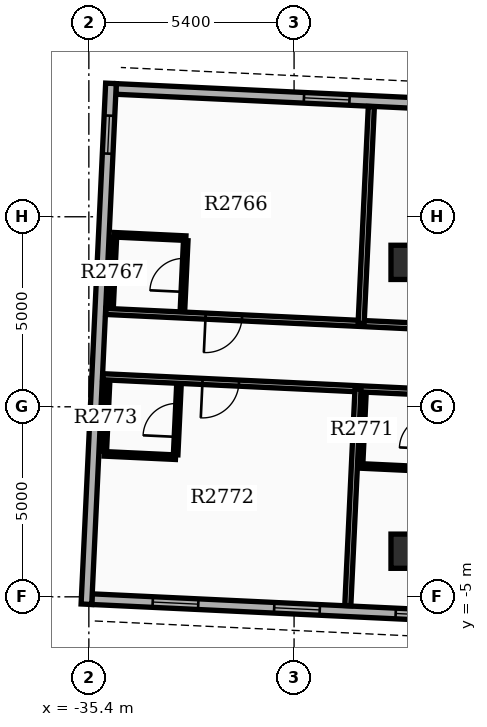
"""IFC4 building model, lengths in metres.
Left out: names, types, materials, properties, quantities, classifications, styles, units other than length and angle.
Written with IfcOpenShell. Run it as: python <this file> out.ifc"""

import sys

from ifc_helpers import new_model, si_unit, direction, frame, frame_2d, origin, origin_2d, place, context, subcontext, project, spatial, rectangle, extrude, element, fill, save


model = new_model("IFC4")
c1 = context("Model", 3, precision=1e-05, world=origin(), true_north=direction((0.0, 1.0)))
c2 = subcontext(c1, "Body", "Model", "MODEL_VIEW")
j1 = project(units=[si_unit("LENGTHUNIT", "METRE"), si_unit("PLANEANGLEUNIT", "RADIAN")], contexts=[c1])
p1 = place(None, origin())
s1 = spatial("IfcSite", under=j1, at=p1, CompositionType="ELEMENT")
p2 = place(p1, origin())
s2 = spatial("IfcBuilding", under=s1, at=p2, CompositionType="ELEMENT")
p3 = place(p2, frame((0.0, 0.0, 172.2)))
s3 = spatial("IfcBuildingStorey", under=s2, at=p3, CompositionType="ELEMENT", Elevation=172.2)
for number, where, z_axis, x_axis in (
    (1, (-27.0, -3.8, 0.0), (0.0, 0.0, 1.0), (1.0, 0.0, 0.0)),
    (2, (-27.0, 3.8, 0.0), (0.0, 0.0, 1.0), (1.0, 0.0, 0.0)),
):
    element("IfcColumn", number, at=place(p3, frame(where, z_axis=z_axis, x_axis=x_axis)), inside=s3, PredefinedType="COLUMN", context=c2, shape_type="SweptSolid", body=[
        extrude(rectangle(XDim=0.9, YDim=0.9, at=origin_2d()), origin(), (0.0, 0.0, 1.0), 3.9),
    ])
p4 = place(p3, frame((-14.607, 7.416, 0.0), z_axis=(0.0, 0.0, 1.0), x_axis=(-0.998890015344, 0.047103473814, 0.0)))
e3 = element("IfcWall", 3, at=p4, inside=s3, PredefinedType="STANDARD", context=c2, shape_type="SweptSolid", body=[
    extrude(rectangle(XDim=20.1, YDim=0.28, at=frame_2d((10.05, 0.0))), origin(), (0.0, 0.0, 1.0), 2.97),
])
p5 = place(p4, frame((1.6, 0.0, 0.8)))
e4 = element("IfcOpeningElement", 4, at=p5, cuts=e3, PredefinedType="OPENING", context=c2, shape_type="SweptSolid", body=[
    extrude(rectangle(XDim=1.2, YDim=1.6, at=frame_2d((0.6, 0.8))), frame((0.0, 0.15, 0.0), z_axis=(0.0, -1.0, 0.0), x_axis=(1.0, 0.0, 0.0)), (0.0, 0.0, 1.0), 0.3),
])
p6 = place(p4, frame((6.8, 0.0, 0.8)))
e5 = element("IfcOpeningElement", 5, at=p6, cuts=e3, PredefinedType="OPENING", context=c2, shape_type="SweptSolid", body=[
    extrude(rectangle(XDim=1.2, YDim=1.6, at=frame_2d((0.6, 0.8))), frame((0.0, 0.15, 0.0), z_axis=(0.0, -1.0, 0.0), x_axis=(1.0, 0.0, 0.0)), (0.0, 0.0, 1.0), 0.3),
])
p7 = place(p4, frame((10.0, 0.0, 0.8)))
e6 = element("IfcOpeningElement", 6, at=p7, cuts=e3, PredefinedType="OPENING", context=c2, shape_type="SweptSolid", body=[
    extrude(rectangle(XDim=1.2, YDim=1.6, at=frame_2d((0.6, 0.8))), frame((0.0, 0.15, 0.0), z_axis=(0.0, -1.0, 0.0), x_axis=(1.0, 0.0, 0.0)), (0.0, 0.0, 1.0), 0.3),
])
p8 = place(p4, frame((13.95, 0.0, 0.8)))
e7 = element("IfcOpeningElement", 7, at=p8, cuts=e3, PredefinedType="OPENING", context=c2, shape_type="SweptSolid", body=[
    extrude(rectangle(XDim=1.2, YDim=1.6, at=frame_2d((0.6, 0.8))), frame((0.0, 0.15, 0.0), z_axis=(0.0, -1.0, 0.0), x_axis=(1.0, 0.0, 0.0)), (0.0, 0.0, 1.0), 0.3),
])
p9 = place(p3, frame((-35.318, -5.062, 0.0), z_axis=(0.0, 0.0, 1.0), x_axis=(0.998890015344, -0.047103473814, 0.0)))
e8 = element("IfcWall", 8, at=p9, inside=s3, PredefinedType="STANDARD", context=c2, shape_type="SweptSolid", body=[
    extrude(rectangle(XDim=20.1, YDim=0.28, at=frame_2d((10.05, 0.0))), origin(), (0.0, 0.0, 1.0), 2.97),
])
p10 = place(p9, frame((1.6, 0.0, 0.8)))
e9 = element("IfcOpeningElement", 9, at=p10, cuts=e8, PredefinedType="OPENING", context=c2, shape_type="SweptSolid", body=[
    extrude(rectangle(XDim=1.2, YDim=1.6, at=frame_2d((0.6, 0.8))), frame((0.0, 0.15, 0.0), z_axis=(0.0, -1.0, 0.0), x_axis=(1.0, 0.0, 0.0)), (0.0, 0.0, 1.0), 0.3),
])
p11 = place(p9, frame((4.8, 0.0, 0.8)))
e10 = element("IfcOpeningElement", 10, at=p11, cuts=e8, PredefinedType="OPENING", context=c2, shape_type="SweptSolid", body=[
    extrude(rectangle(XDim=1.2, YDim=1.6, at=frame_2d((0.6, 0.8))), frame((0.0, 0.15, 0.0), z_axis=(0.0, -1.0, 0.0), x_axis=(1.0, 0.0, 0.0)), (0.0, 0.0, 1.0), 0.3),
])
p12 = place(p9, frame((8.0, 0.0, 0.8)))
e11 = element("IfcOpeningElement", 11, at=p12, cuts=e8, PredefinedType="OPENING", context=c2, shape_type="SweptSolid", body=[
    extrude(rectangle(XDim=1.2, YDim=1.6, at=frame_2d((0.6, 0.8))), frame((0.0, 0.15, 0.0), z_axis=(0.0, -1.0, 0.0), x_axis=(1.0, 0.0, 0.0)), (0.0, 0.0, 1.0), 0.3),
])
p13 = place(p9, frame((11.2, 0.0, 0.8)))
e12 = element("IfcOpeningElement", 12, at=p13, cuts=e8, PredefinedType="OPENING", context=c2, shape_type="SweptSolid", body=[
    extrude(rectangle(XDim=1.2, YDim=1.6, at=frame_2d((0.6, 0.8))), frame((0.0, 0.15, 0.0), z_axis=(0.0, -1.0, 0.0), x_axis=(1.0, 0.0, 0.0)), (0.0, 0.0, 1.0), 0.3),
])
p14 = place(p9, frame((14.799, 0.0, 0.85)))
e13 = element("IfcOpeningElement", 13, at=p14, cuts=e8, PredefinedType="OPENING", context=c2, shape_type="SweptSolid", body=[
    extrude(rectangle(XDim=1.2, YDim=1.6, at=frame_2d((0.6, 0.8))), frame((0.0, 0.15, 0.0), z_axis=(0.0, -1.0, 0.0), x_axis=(1.0, 0.0, 0.0)), (0.0, 0.0, 1.0), 0.3),
])
p15 = place(p3, frame((-34.818, 8.51, 0.0), z_axis=(0.0, 0.0, 1.0), x_axis=(-0.047101845086, -0.998890092147, 0.0)))
e14 = element("IfcWall", 14, at=p15, inside=s3, PredefinedType="STANDARD", context=c2, shape_type="SweptSolid", body=[
    extrude(rectangle(XDim=13.72, YDim=0.28, at=frame_2d((6.86, 0.0))), origin(), (0.0, 0.0, 1.0), 2.97),
])
p16 = place(p15, frame((0.85, 0.0, 0.85)))
e15 = element("IfcOpeningElement", 15, at=p16, cuts=e14, PredefinedType="OPENING", context=c2, shape_type="SweptSolid", body=[
    extrude(rectangle(XDim=1.0, YDim=1.5, at=frame_2d((0.5, 0.75))), frame((0.0, 0.15, 0.0), z_axis=(0.0, -1.0, 0.0), x_axis=(1.0, 0.0, 0.0)), (0.0, 0.0, 1.0), 0.3),
])
p17 = place(p3, frame((-14.793, 1.559, 0.0), z_axis=(0.0, 0.0, 1.0), x_axis=(-0.998889926753, 0.047105352469, 0.0)))
e16 = element("IfcWall", 16, at=p17, inside=s3, PredefinedType="PARTITIONING", context=c2, shape_type="SweptSolid", body=[
    extrude(rectangle(XDim=20.182, YDim=0.16, at=frame_2d((10.091, 0.0))), origin(), (0.0, 0.0, 1.0), 2.96),
])
p18 = place(p17, frame((2.615, 0.0, 0.0)))
e17 = element("IfcOpeningElement", 17, at=p18, cuts=e16, PredefinedType="OPENING", context=c2, shape_type="SweptSolid", body=[
    extrude(rectangle(XDim=0.96, YDim=2.15, at=frame_2d((0.48, 1.075))), frame((0.0, 0.09, 0.0), z_axis=(0.0, -1.0, 0.0), x_axis=(1.0, 0.0, 0.0)), (0.0, 0.0, 1.0), 0.18),
])
p19 = place(p17, frame((9.043, 0.0, 0.0)))
e18 = element("IfcOpeningElement", 18, at=p19, cuts=e16, PredefinedType="OPENING", context=c2, shape_type="SweptSolid", body=[
    extrude(rectangle(XDim=0.96, YDim=2.15, at=frame_2d((0.48, 1.075))), frame((0.0, 0.09, 0.0), z_axis=(0.0, -1.0, 0.0), x_axis=(1.0, 0.0, 0.0)), (0.0, 0.0, 1.0), 0.18),
])
p20 = place(p17, frame((16.595, 0.0, 0.0)))
e19 = element("IfcOpeningElement", 19, at=p20, cuts=e16, PredefinedType="OPENING", context=c2, shape_type="SweptSolid", body=[
    extrude(rectangle(XDim=0.96, YDim=2.15, at=frame_2d((0.48, 1.075))), frame((0.0, 0.09, 0.0), z_axis=(0.0, -1.0, 0.0), x_axis=(1.0, 0.0, 0.0)), (0.0, 0.0, 1.0), 0.18),
])
p21 = place(p3, frame((-28.236, 2.192, 0.0), z_axis=(0.0, 0.0, 1.0), x_axis=(0.047100122846, 0.998890173356, 0.0)))
e20 = element("IfcWall", 20, at=p21, inside=s3, PredefinedType="PARTITIONING", context=c2, shape_type="SweptSolid", body=[
    extrude(rectangle(XDim=5.712, YDim=0.16, at=frame_2d((2.856, 0.0))), origin(), (0.0, 0.0, 1.0), 2.96),
])
p22 = place(p3, frame((-32.936, 2.554, 0.0), z_axis=(0.0, 0.0, 1.0), x_axis=(0.047080807099, 0.998891083954, 0.0)))
e21 = element("IfcWall", 21, at=p22, inside=s3, PredefinedType="PARTITIONING", context=c2, shape_type="SweptSolid", body=[
    extrude(rectangle(XDim=1.82, YDim=0.12, at=frame_2d((0.91, 0.0))), origin(), (0.0, 0.0, 1.0), 2.96),
])
p23 = place(p22, frame((0.47, 0.0, 0.0)))
e22 = element("IfcOpeningElement", 22, at=p23, cuts=e21, PredefinedType="OPENING", context=c2, shape_type="SweptSolid", body=[
    extrude(rectangle(XDim=0.88, YDim=2.1, at=frame_2d((0.44, 1.05))), frame((0.0, 0.07, 0.0), z_axis=(0.0, -1.0, 0.0), x_axis=(1.0, 0.0, 0.0)), (0.0, 0.0, 1.0), 0.14),
])
p24 = place(p3, frame((-34.814, 2.643, 0.0), z_axis=(0.0, 0.0, 1.0), x_axis=(0.047080807099, 0.998891083954, 0.0)))
e23 = element("IfcWall", 23, at=p24, inside=s3, PredefinedType="PARTITIONING", context=c2, shape_type="SweptSolid", body=[
    extrude(rectangle(XDim=1.82, YDim=0.12, at=frame_2d((0.91, 0.0))), origin(), (0.0, 0.0, 1.0), 2.96),
])
p25 = place(p3, frame((-32.847, 4.437, 0.0), z_axis=(0.0, 0.0, 1.0), x_axis=(-0.998888319371, 0.047139425368, 0.0)))
e24 = element("IfcWall", 24, at=p25, inside=s3, PredefinedType="PARTITIONING", context=c2, shape_type="SweptSolid", body=[
    extrude(rectangle(XDim=1.88, YDim=0.12, at=frame_2d((0.94, 0.0))), origin(), (0.0, 0.0, 1.0), 2.96),
])
p26 = place(p3, frame((-14.874, -0.159, 0.0), z_axis=(0.0, 0.0, 1.0), x_axis=(-0.998889926753, 0.047105352469, 0.0)))
e25 = element("IfcWall", 25, at=p26, inside=s3, PredefinedType="PARTITIONING", context=c2, shape_type="SweptSolid", body=[
    extrude(rectangle(XDim=20.182, YDim=0.16, at=frame_2d((10.091, 0.0))), origin(), (0.0, 0.0, 1.0), 2.96),
])
p27 = place(p26, frame((2.615, 0.0, 0.0)))
e26 = element("IfcOpeningElement", 26, at=p27, cuts=e25, PredefinedType="OPENING", context=c2, shape_type="SweptSolid", body=[
    extrude(rectangle(XDim=0.96, YDim=2.15, at=frame_2d((0.48, 1.075))), frame((0.0, 0.09, 0.0), z_axis=(0.0, -1.0, 0.0), x_axis=(1.0, 0.0, 0.0)), (0.0, 0.0, 1.0), 0.18),
])
p28 = place(p26, frame((8.055, 0.0, 0.0)))
e27 = element("IfcOpeningElement", 27, at=p28, cuts=e25, PredefinedType="OPENING", context=c2, shape_type="SweptSolid", body=[
    extrude(rectangle(XDim=0.96, YDim=2.15, at=frame_2d((0.48, 1.075))), frame((0.0, 0.09, 0.0), z_axis=(0.0, -1.0, 0.0), x_axis=(1.0, 0.0, 0.0)), (0.0, 0.0, 1.0), 0.18),
])
p29 = place(p26, frame((16.595, 0.0, 0.0)))
e28 = element("IfcOpeningElement", 28, at=p29, cuts=e25, PredefinedType="OPENING", context=c2, shape_type="SweptSolid", body=[
    extrude(rectangle(XDim=0.96, YDim=2.15, at=frame_2d((0.48, 1.075))), frame((0.0, 0.09, 0.0), z_axis=(0.0, -1.0, 0.0), x_axis=(1.0, 0.0, 0.0)), (0.0, 0.0, 1.0), 0.18),
])
p30 = place(p3, frame((-28.317, 0.474, 0.0), z_axis=(0.0, 0.0, 1.0), x_axis=(-0.047102133785, -0.998890078534, 0.0)))
e29 = element("IfcWall", 29, at=p30, inside=s3, PredefinedType="PARTITIONING", context=c2, shape_type="SweptSolid", body=[
    extrude(rectangle(XDim=5.712, YDim=0.16, at=frame_2d((2.856, 0.0))), origin(), (0.0, 0.0, 1.0), 2.96),
])
p31 = place(p3, frame((-28.25, -1.491, 0.0), z_axis=(0.0, 0.0, 1.0), x_axis=(0.047080807099, 0.998891083954, 0.0)))
e30 = element("IfcWall", 30, at=p31, inside=s3, PredefinedType="PARTITIONING", context=c2, shape_type="SweptSolid", body=[
    extrude(rectangle(XDim=1.82, YDim=0.12, at=frame_2d((0.91, 0.0))), origin(), (0.0, 0.0, 1.0), 2.96),
])
p32 = place(p3, frame((-26.375, -1.644, 0.0), z_axis=(0.0, 0.0, 1.0), x_axis=(-0.998894425757, 0.04700985207, 0.0)))
e31 = element("IfcWall", 31, at=p32, inside=s3, PredefinedType="PARTITIONING", context=c2, shape_type="SweptSolid", body=[
    extrude(rectangle(XDim=1.88, YDim=0.12, at=frame_2d((0.94, 0.0))), origin(), (0.0, 0.0, 1.0), 2.96),
])
p33 = place(p3, frame((-33.116, -1.261, 0.0), z_axis=(0.0, 0.0, 1.0), x_axis=(0.047080807099, 0.998891083954, 0.0)))
e32 = element("IfcWall", 32, at=p33, inside=s3, PredefinedType="PARTITIONING", context=c2, shape_type="SweptSolid", body=[
    extrude(rectangle(XDim=1.82, YDim=0.12, at=frame_2d((0.91, 0.0))), origin(), (0.0, 0.0, 1.0), 2.96),
])
p34 = place(p33, frame((0.47, 0.0, 0.0)))
e33 = element("IfcOpeningElement", 33, at=p34, cuts=e32, PredefinedType="OPENING", context=c2, shape_type="SweptSolid", body=[
    extrude(rectangle(XDim=0.88, YDim=2.1, at=frame_2d((0.44, 1.05))), frame((0.0, 0.07, 0.0), z_axis=(0.0, -1.0, 0.0), x_axis=(1.0, 0.0, 0.0)), (0.0, 0.0, 1.0), 0.14),
])
p35 = place(p3, frame((-34.994, -1.173, 0.0), z_axis=(0.0, 0.0, 1.0), x_axis=(0.047087116047, 0.998890786574, 0.0)))
e34 = element("IfcWall", 34, at=p35, inside=s3, PredefinedType="PARTITIONING", context=c2, shape_type="SweptSolid", body=[
    extrude(rectangle(XDim=1.82, YDim=0.12, at=frame_2d((0.91, 0.0))), origin(), (0.0, 0.0, 1.0), 2.96),
])
p36 = place(p3, frame((-33.119, -1.326, 0.0), z_axis=(0.0, 0.0, 1.0), x_axis=(-0.998888607882, 0.047133311408, 0.0)))
e35 = element("IfcWall", 35, at=p36, inside=s3, PredefinedType="PARTITIONING", context=c2, shape_type="SweptSolid", body=[
    extrude(rectangle(XDim=1.88, YDim=0.12, at=frame_2d((0.94, 0.0))), origin(), (0.0, 0.0, 1.0), 2.96),
])
p37 = place(p8, origin())
e36 = element("IfcWindow", 36, at=p37, inside=s3, PartitioningType="SINGLE_PANEL", PredefinedType="WINDOW", context=c2, shape_type="SweptSolid", body=[
    extrude(rectangle(XDim=1.2, YDim=1.6, at=frame_2d((0.6, 0.8))), frame((0.0, 0.03, 0.0), z_axis=(0.0, -1.0, 0.0), x_axis=(1.0, 0.0, 0.0)), (0.0, 0.0, 1.0), 0.06),
])
fill(e7, e36)
p38 = place(p10, origin())
e37 = element("IfcWindow", 37, at=p38, inside=s3, PartitioningType="SINGLE_PANEL", PredefinedType="WINDOW", context=c2, shape_type="SweptSolid", body=[
    extrude(rectangle(XDim=1.2, YDim=1.6, at=frame_2d((0.6, 0.8))), frame((0.0, 0.03, 0.0), z_axis=(0.0, -1.0, 0.0), x_axis=(1.0, 0.0, 0.0)), (0.0, 0.0, 1.0), 0.06),
])
fill(e9, e37)
p39 = place(p11, origin())
e38 = element("IfcWindow", 38, at=p39, inside=s3, PartitioningType="SINGLE_PANEL", PredefinedType="WINDOW", context=c2, shape_type="SweptSolid", body=[
    extrude(rectangle(XDim=1.2, YDim=1.6, at=frame_2d((0.6, 0.8))), frame((0.0, 0.03, 0.0), z_axis=(0.0, -1.0, 0.0), x_axis=(1.0, 0.0, 0.0)), (0.0, 0.0, 1.0), 0.06),
])
fill(e10, e38)
p40 = place(p12, origin())
e39 = element("IfcWindow", 39, at=p40, inside=s3, PartitioningType="SINGLE_PANEL", PredefinedType="WINDOW", context=c2, shape_type="SweptSolid", body=[
    extrude(rectangle(XDim=1.2, YDim=1.6, at=frame_2d((0.6, 0.8))), frame((0.0, 0.03, 0.0), z_axis=(0.0, -1.0, 0.0), x_axis=(1.0, 0.0, 0.0)), (0.0, 0.0, 1.0), 0.06),
])
fill(e11, e39)
p41 = place(p16, origin())
e40 = element("IfcWindow", 40, at=p41, inside=s3, PartitioningType="SINGLE_PANEL", PredefinedType="WINDOW", context=c2, shape_type="SweptSolid", body=[
    extrude(rectangle(XDim=1.0, YDim=1.5, at=frame_2d((0.5, 0.75))), frame((0.0, 0.03, 0.0), z_axis=(0.0, -1.0, 0.0), x_axis=(1.0, 0.0, 0.0)), (0.0, 0.0, 1.0), 0.06),
])
fill(e15, e40)
p42 = place(p20, origin())
e41 = element("IfcDoor", 41, at=p42, inside=s3, OperationType="SINGLE_SWING_RIGHT", PredefinedType="DOOR", context=c2, shape_type="SweptSolid", body=[
    extrude(rectangle(XDim=0.96, YDim=2.15, at=frame_2d((0.48, 1.075))), frame((0.0, 0.025, 0.0), z_axis=(0.0, -1.0, 0.0), x_axis=(1.0, 0.0, 0.0)), (0.0, 0.0, 1.0), 0.05),
])
fill(e19, e41)
p43 = place(p23, origin())
e42 = element("IfcDoor", 42, at=p43, inside=s3, OperationType="SINGLE_SWING_LEFT", PredefinedType="DOOR", context=c2, shape_type="SweptSolid", body=[
    extrude(rectangle(XDim=0.88, YDim=2.1, at=frame_2d((0.44, 1.05))), frame((0.0, 0.025, 0.0), z_axis=(0.0, -1.0, 0.0), x_axis=(1.0, 0.0, 0.0)), (0.0, 0.0, 1.0), 0.05),
])
fill(e22, e42)
p44 = place(p29, origin())
e43 = element("IfcDoor", 43, at=p44, inside=s3, OperationType="SINGLE_SWING_RIGHT", PredefinedType="DOOR", context=c2, shape_type="SweptSolid", body=[
    extrude(rectangle(XDim=0.96, YDim=2.15, at=frame_2d((0.48, 1.075))), frame((0.0, 0.025, 0.0), z_axis=(0.0, -1.0, 0.0), x_axis=(1.0, 0.0, 0.0)), (0.0, 0.0, 1.0), 0.05),
])
fill(e28, e43)
p45 = place(p34, origin())
e44 = element("IfcDoor", 44, at=p45, inside=s3, OperationType="SINGLE_SWING_LEFT", PredefinedType="DOOR", context=c2, shape_type="SweptSolid", body=[
    extrude(rectangle(XDim=0.88, YDim=2.1, at=frame_2d((0.44, 1.05))), frame((0.0, 0.025, 0.0), z_axis=(0.0, -1.0, 0.0), x_axis=(1.0, 0.0, 0.0)), (0.0, 0.0, 1.0), 0.05),
])
fill(e33, e44)
save(model, sys.argv[1])
